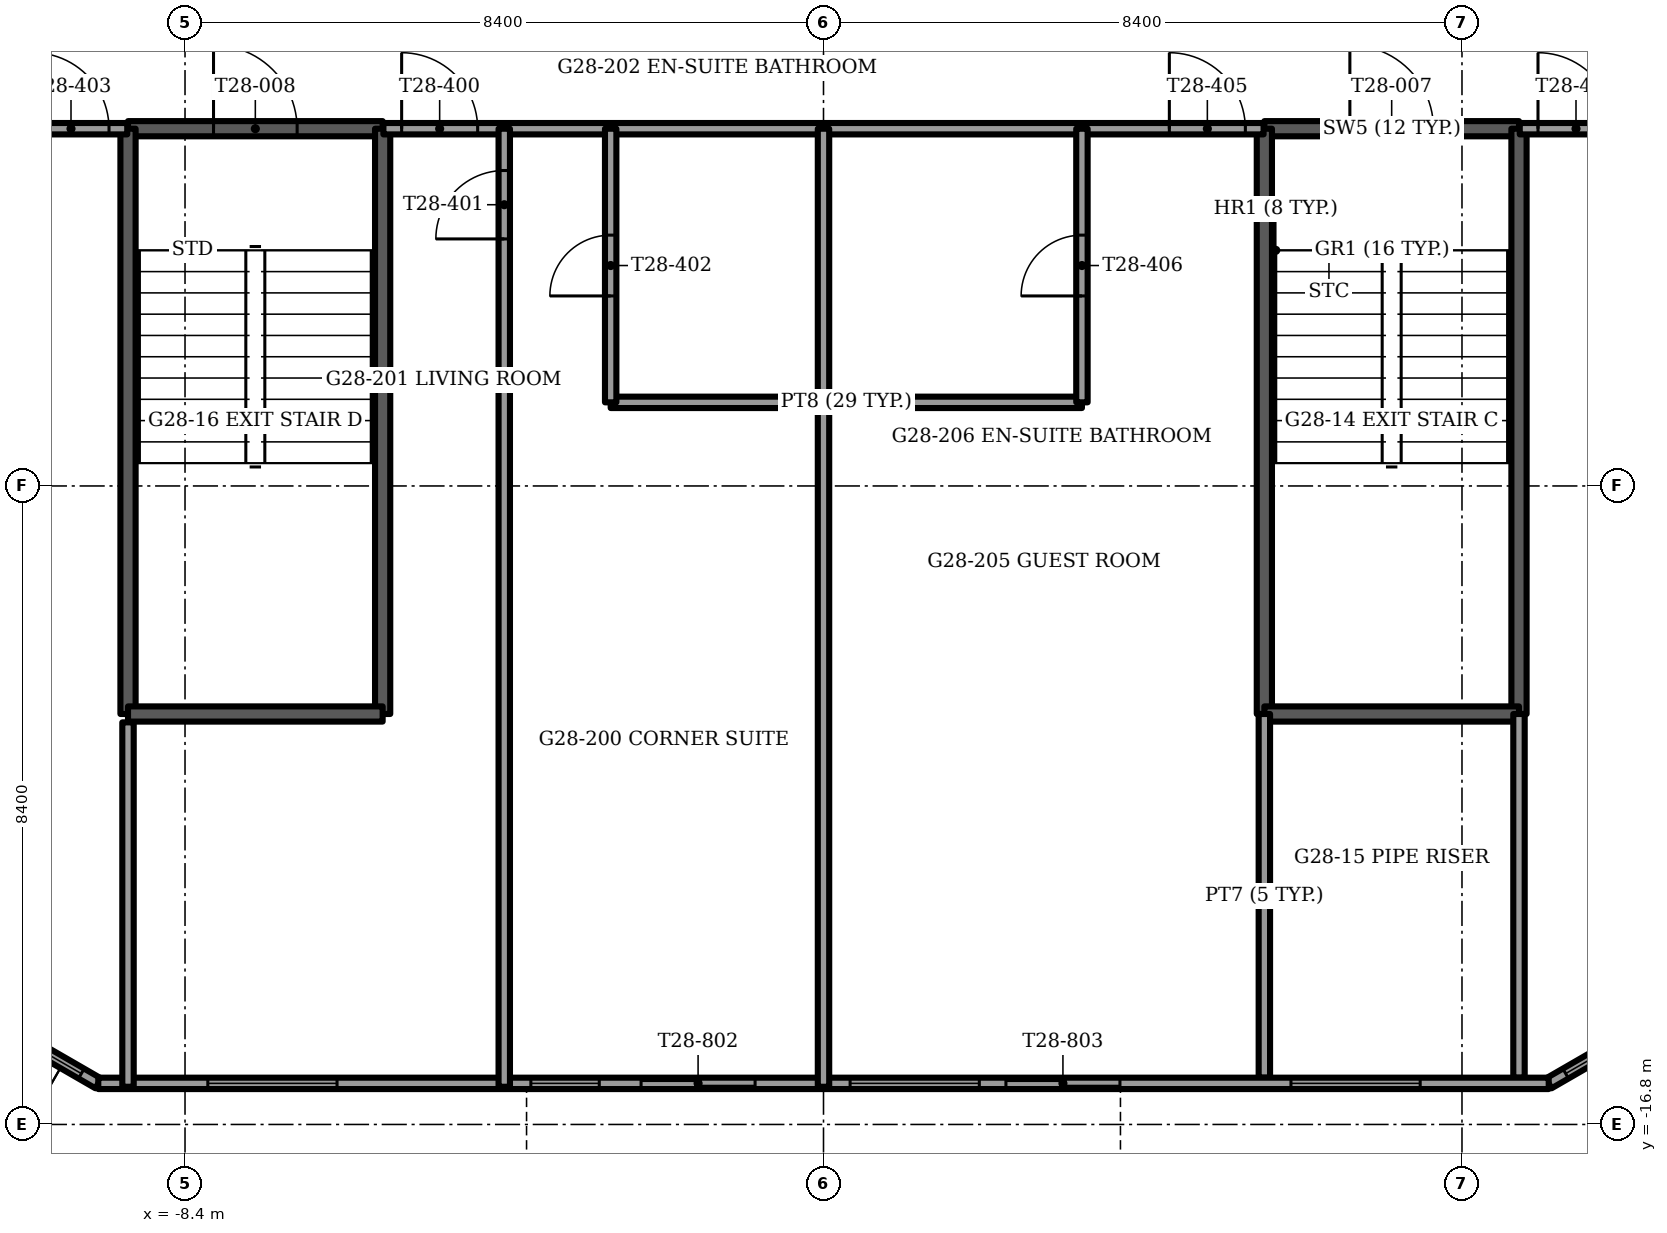
"""IFC4 building model, lengths in metres.
Left out: names, types, materials, properties, quantities, classifications, styles, units other than length and angle.
Written with IfcOpenShell. Run it as: python <this file> out.ifc"""

import sys

from ifc_helpers import new_model, si_unit, direction, frame, frame_2d, origin, place, context, subcontext, project, spatial, rectangle, extrude, element, fill, save


model = new_model("IFC4")
c1 = context("Model", 3, precision=1e-05, world=origin(), true_north=direction((0.0, 1.0)))
c2 = subcontext(c1, "Body", "Model", "MODEL_VIEW")
j1 = project(units=[si_unit("LENGTHUNIT", "METRE"), si_unit("PLANEANGLEUNIT", "RADIAN")], contexts=[c1])
p1 = place(None, origin())
s1 = spatial("IfcSite", under=j1, at=p1, CompositionType="ELEMENT")
p2 = place(p1, origin())
s2 = spatial("IfcBuilding", under=s1, at=p2, CompositionType="ELEMENT")
p3 = place(p2, frame((0.0, 0.0, 116.0)))
s3 = spatial("IfcBuildingStorey", under=s2, at=p3, CompositionType="ELEMENT", Elevation=116.0)
p4 = place(p3, frame((-9.541, -16.26, 0.0), z_axis=(0.0, 0.0, 1.0), x_axis=(1.0, 0.0, 0.0)))
e1 = element("IfcWall", 1, at=p4, inside=s3, PredefinedType="SOLIDWALL", context=c2, shape_type="SweptSolid", body=[
    extrude(rectangle(XDim=19.082, YDim=0.15, at=frame_2d((9.541, 0.0))), origin(), (0.0, 0.0, 1.0), 3.45),
])
p5 = place(p4, frame((1.441, 0.0, 0.15)))
e2 = element("IfcOpeningElement", 2, at=p5, cuts=e1, PredefinedType="OPENING", context=c2, shape_type="SweptSolid", body=[
    extrude(rectangle(XDim=1.7, YDim=2.85, at=frame_2d((0.85, 1.425))), frame((0.0, 0.075, 0.0), z_axis=(0.0, -1.0, 0.0), x_axis=(1.0, 0.0, 0.0)), (0.0, 0.0, 1.0), 0.15),
])
p6 = place(p4, frame((5.691, 0.0, 0.15)))
e3 = element("IfcOpeningElement", 3, at=p6, cuts=e1, PredefinedType="OPENING", context=c2, shape_type="SweptSolid", body=[
    extrude(rectangle(XDim=0.9, YDim=2.85, at=frame_2d((0.45, 1.425))), frame((0.0, 0.075, 0.0), z_axis=(0.0, -1.0, 0.0), x_axis=(1.0, 0.0, 0.0)), (0.0, 0.0, 1.0), 0.15),
])
p7 = place(p4, frame((7.141, 0.0, 0.0)))
e4 = element("IfcOpeningElement", 4, at=p7, cuts=e1, PredefinedType="OPENING", context=c2, shape_type="SweptSolid", body=[
    extrude(rectangle(XDim=1.5, YDim=2.4, at=frame_2d((0.75, 1.2))), frame((0.0, 0.075, 0.0), z_axis=(0.0, -1.0, 0.0), x_axis=(1.0, 0.0, 0.0)), (0.0, 0.0, 1.0), 0.15),
])
p8 = place(p4, frame((9.891, 0.0, 0.15)))
e5 = element("IfcOpeningElement", 5, at=p8, cuts=e1, PredefinedType="OPENING", context=c2, shape_type="SweptSolid", body=[
    extrude(rectangle(XDim=1.7, YDim=2.85, at=frame_2d((0.85, 1.425))), frame((0.0, 0.075, 0.0), z_axis=(0.0, -1.0, 0.0), x_axis=(1.0, 0.0, 0.0)), (0.0, 0.0, 1.0), 0.15),
])
p9 = place(p4, frame((11.941, 0.0, 0.0)))
e6 = element("IfcOpeningElement", 6, at=p9, cuts=e1, PredefinedType="OPENING", context=c2, shape_type="SweptSolid", body=[
    extrude(rectangle(XDim=1.5, YDim=2.4, at=frame_2d((0.75, 1.2))), frame((0.0, 0.075, 0.0), z_axis=(0.0, -1.0, 0.0), x_axis=(1.0, 0.0, 0.0)), (0.0, 0.0, 1.0), 0.15),
])
p10 = place(p4, frame((15.691, 0.0, 0.15)))
e7 = element("IfcOpeningElement", 7, at=p10, cuts=e1, PredefinedType="OPENING", context=c2, shape_type="SweptSolid", body=[
    extrude(rectangle(XDim=1.7, YDim=2.85, at=frame_2d((0.85, 1.425))), frame((0.0, 0.075, 0.0), z_axis=(0.0, -1.0, 0.0), x_axis=(1.0, 0.0, 0.0)), (0.0, 0.0, 1.0), 0.15),
])
p11 = place(p3, frame((-10.463, -15.727, 0.0), z_axis=(0.0, 0.0, 1.0), x_axis=(0.866048165231, -0.499960573946, 0.0)))
e8 = element("IfcWall", 8, at=p11, inside=s3, PredefinedType="SOLIDWALL", context=c2, shape_type="SweptSolid", body=[
    extrude(rectangle(XDim=1.065, YDim=0.15, at=frame_2d((0.532, 0.0))), origin(), (0.0, 0.0, 1.0), 3.45),
])
p12 = place(p11, frame((0.258, 0.0, 0.15)))
e9 = element("IfcOpeningElement", 9, at=p12, cuts=e8, PredefinedType="OPENING", context=c2, shape_type="SweptSolid", body=[
    extrude(rectangle(XDim=0.55, YDim=2.85, at=frame_2d((0.275, 1.425))), frame((0.0, 0.075, 0.0), z_axis=(0.0, -1.0, 0.0), x_axis=(1.0, 0.0, 0.0)), (0.0, 0.0, 1.0), 0.15),
])
p13 = place(p3, frame((9.541, -16.26, 0.0), z_axis=(0.0, 0.0, 1.0), x_axis=(0.866048165231, 0.499960573946, 0.0)))
e10 = element("IfcWall", 10, at=p13, inside=s3, PredefinedType="SOLIDWALL", context=c2, shape_type="SweptSolid", body=[
    extrude(rectangle(XDim=1.065, YDim=0.15, at=frame_2d((0.532, 0.0))), origin(), (0.0, 0.0, 1.0), 3.45),
])
p14 = place(p13, frame((0.258, 0.0, 0.15)))
e11 = element("IfcOpeningElement", 11, at=p14, cuts=e10, PredefinedType="OPENING", context=c2, shape_type="SweptSolid", body=[
    extrude(rectangle(XDim=0.55, YDim=2.85, at=frame_2d((0.275, 1.425))), frame((0.0, 0.075, 0.0), z_axis=(0.0, -1.0, 0.0), x_axis=(1.0, 0.0, 0.0)), (0.0, 0.0, 1.0), 0.15),
])
p15 = place(p3, frame((5.8, -3.7, -0.3), z_axis=(0.0, 0.0, 1.0), x_axis=(1.0, 0.0, 0.0)))
e12 = element("IfcWall", 12, at=p15, inside=s3, PredefinedType="SOLIDWALL", context=c2, shape_type="SweptSolid", body=[
    extrude(rectangle(XDim=3.35, YDim=0.2, at=frame_2d((1.675, 0.0))), origin(), (0.0, 0.0, 1.0), 3.75),
])
p16 = place(p15, frame((1.125, 0.0, 0.0)))
e13 = element("IfcOpeningElement", 13, at=p16, cuts=e12, PredefinedType="OPENING", context=c2, shape_type="SweptSolid", body=[
    extrude(rectangle(XDim=1.1, YDim=2.1, at=frame_2d((0.55, 1.05))), frame((0.0, 0.1, 0.0), z_axis=(0.0, -1.0, 0.0), x_axis=(1.0, 0.0, 0.0)), (0.0, 0.0, 1.0), 0.2),
])
for number, where, z_axis, x_axis in (
    (14, (5.8, -3.7, -0.3), (0.0, 0.0, 1.0), (0.0, -1.0, 0.0)),
    (15, (9.15, -3.7, -0.3), (0.0, 0.0, 1.0), (0.0, -1.0, 0.0)),
):
    element("IfcWall", number, at=place(p3, frame(where, z_axis=z_axis, x_axis=x_axis)), inside=s3, PredefinedType="SOLIDWALL", context=c2, shape_type="SweptSolid", body=[
        extrude(rectangle(XDim=7.7, YDim=0.2, at=frame_2d((3.85, 0.0))), origin(), (0.0, 0.0, 1.0), 3.75),
    ])
p17 = place(p3, frame((5.8, -11.4, -0.3), z_axis=(0.0, 0.0, 1.0), x_axis=(1.0, 0.0, 0.0)))
e16 = element("IfcWall", 16, at=p17, inside=s3, PredefinedType="SOLIDWALL", context=c2, shape_type="SweptSolid", body=[
    extrude(rectangle(XDim=3.35, YDim=0.2, at=frame_2d((1.675, 0.0))), origin(), (0.0, 0.0, 1.0), 3.75),
])
for number, where, z_axis, x_axis in (
    (17, (5.8, -11.4, 0.0), (0.0, 0.0, 1.0), (0.0, -1.0, 0.0)),
    (18, (9.15, -11.4, 0.0), (0.0, 0.0, 1.0), (0.0, -1.0, 0.0)),
):
    element("IfcWall", number, at=place(p3, frame(where, z_axis=z_axis, x_axis=x_axis)), inside=s3, PredefinedType="PARTITIONING", context=c2, shape_type="SweptSolid", body=[
        extrude(rectangle(XDim=4.785, YDim=0.15, at=frame_2d((2.392, 0.0))), origin(), (0.0, 0.0, 1.0), 3.45),
    ])
p18 = place(p3, frame((-9.15, -3.7, -0.3), z_axis=(0.0, 0.0, 1.0), x_axis=(1.0, 0.0, 0.0)))
e19 = element("IfcWall", 19, at=p18, inside=s3, PredefinedType="SOLIDWALL", context=c2, shape_type="SweptSolid", body=[
    extrude(rectangle(XDim=3.35, YDim=0.2, at=frame_2d((1.675, 0.0))), origin(), (0.0, 0.0, 1.0), 3.75),
])
p19 = place(p18, frame((1.125, 0.0, 0.0)))
e20 = element("IfcOpeningElement", 20, at=p19, cuts=e19, PredefinedType="OPENING", context=c2, shape_type="SweptSolid", body=[
    extrude(rectangle(XDim=1.1, YDim=2.1, at=frame_2d((0.55, 1.05))), frame((0.0, 0.1, 0.0), z_axis=(0.0, -1.0, 0.0), x_axis=(1.0, 0.0, 0.0)), (0.0, 0.0, 1.0), 0.2),
])
for number, where, z_axis, x_axis in (
    (21, (-9.15, -3.7, -0.3), (0.0, 0.0, 1.0), (0.0, -1.0, 0.0)),
    (22, (-5.8, -3.7, -0.3), (0.0, 0.0, 1.0), (0.0, -1.0, 0.0)),
):
    element("IfcWall", number, at=place(p3, frame(where, z_axis=z_axis, x_axis=x_axis)), inside=s3, PredefinedType="SOLIDWALL", context=c2, shape_type="SweptSolid", body=[
        extrude(rectangle(XDim=7.7, YDim=0.2, at=frame_2d((3.85, 0.0))), origin(), (0.0, 0.0, 1.0), 3.75),
    ])
p20 = place(p3, frame((-9.15, -11.4, -0.3), z_axis=(0.0, 0.0, 1.0), x_axis=(1.0, 0.0, 0.0)))
e23 = element("IfcWall", 23, at=p20, inside=s3, PredefinedType="SOLIDWALL", context=c2, shape_type="SweptSolid", body=[
    extrude(rectangle(XDim=3.35, YDim=0.2, at=frame_2d((1.675, 0.0))), origin(), (0.0, 0.0, 1.0), 3.75),
])
p21 = place(p3, frame((-2.8, -7.3, 0.0), z_axis=(0.0, 0.0, 1.0), x_axis=(1.0, 0.0, 0.0)))
e24 = element("IfcWall", 24, at=p21, inside=s3, PredefinedType="PARTITIONING", context=c2, shape_type="SweptSolid", body=[
    extrude(rectangle(XDim=6.2, YDim=0.15, at=frame_2d((3.1, 0.0))), origin(), (0.0, 0.0, 1.0), 3.45),
])
p22 = place(p3, frame((-17.459, -3.7, 0.0), z_axis=(0.0, 0.0, 1.0), x_axis=(1.0, 0.0, 0.0)))
e25 = element("IfcWall", 25, at=p22, inside=s3, PredefinedType="PARTITIONING", context=c2, shape_type="SweptSolid", body=[
    extrude(rectangle(XDim=8.299, YDim=0.15, at=frame_2d((4.149, 0.0))), origin(), (0.0, 0.0, 1.0), 3.45),
])
p23 = place(p22, frame((7.059, 0.0, 0.0)))
e26 = element("IfcOpeningElement", 26, at=p23, cuts=e25, PredefinedType="OPENING", context=c2, shape_type="SweptSolid", body=[
    extrude(rectangle(XDim=1.0, YDim=2.1, at=frame_2d((0.5, 1.05))), frame((0.0, 0.075, 0.0), z_axis=(0.0, -1.0, 0.0), x_axis=(1.0, 0.0, 0.0)), (0.0, 0.0, 1.0), 0.15),
])
p24 = place(p3, frame((-5.79, -3.7, 0.0), z_axis=(0.0, 0.0, 1.0), x_axis=(1.0, 0.0, 0.0)))
e27 = element("IfcWall", 27, at=p24, inside=s3, PredefinedType="PARTITIONING", context=c2, shape_type="SweptSolid", body=[
    extrude(rectangle(XDim=11.58, YDim=0.15, at=frame_2d((5.79, 0.0))), origin(), (0.0, 0.0, 1.0), 3.45),
])
p25 = place(p24, frame((0.24, 0.0, 0.0)))
e28 = element("IfcOpeningElement", 28, at=p25, cuts=e27, PredefinedType="OPENING", context=c2, shape_type="SweptSolid", body=[
    extrude(rectangle(XDim=1.0, YDim=2.1, at=frame_2d((0.5, 1.05))), frame((0.0, 0.075, 0.0), z_axis=(0.0, -1.0, 0.0), x_axis=(1.0, 0.0, 0.0)), (0.0, 0.0, 1.0), 0.15),
])
p26 = place(p24, frame((10.34, 0.0, 0.0)))
e29 = element("IfcOpeningElement", 29, at=p26, cuts=e27, PredefinedType="OPENING", context=c2, shape_type="SweptSolid", body=[
    extrude(rectangle(XDim=1.0, YDim=2.1, at=frame_2d((0.5, 1.05))), frame((0.0, 0.075, 0.0), z_axis=(0.0, -1.0, 0.0), x_axis=(1.0, 0.0, 0.0)), (0.0, 0.0, 1.0), 0.15),
])
p27 = place(p3, frame((9.16, -3.7, 0.0), z_axis=(0.0, 0.0, 1.0), x_axis=(1.0, 0.0, 0.0)))
e30 = element("IfcWall", 30, at=p27, inside=s3, PredefinedType="PARTITIONING", context=c2, shape_type="SweptSolid", body=[
    extrude(rectangle(XDim=8.299, YDim=0.15, at=frame_2d((4.149, 0.0))), origin(), (0.0, 0.0, 1.0), 3.45),
])
p28 = place(p27, frame((0.24, 0.0, 0.0)))
e31 = element("IfcOpeningElement", 31, at=p28, cuts=e30, PredefinedType="OPENING", context=c2, shape_type="SweptSolid", body=[
    extrude(rectangle(XDim=1.0, YDim=2.1, at=frame_2d((0.5, 1.05))), frame((0.0, 0.075, 0.0), z_axis=(0.0, -1.0, 0.0), x_axis=(1.0, 0.0, 0.0)), (0.0, 0.0, 1.0), 0.15),
])
p29 = place(p3, frame((3.4, -7.3, 0.0), z_axis=(0.0, 0.0, 1.0), x_axis=(0.0, 1.0, 0.0)))
e32 = element("IfcWall", 32, at=p29, inside=s3, PredefinedType="PARTITIONING", context=c2, shape_type="SweptSolid", body=[
    extrude(rectangle(XDim=3.6, YDim=0.15, at=frame_2d((1.8, 0.0))), origin(), (0.0, 0.0, 1.0), 3.45),
])
p30 = place(p29, frame((1.4, 0.0, 0.0)))
e33 = element("IfcOpeningElement", 33, at=p30, cuts=e32, PredefinedType="OPENING", context=c2, shape_type="SweptSolid", body=[
    extrude(rectangle(XDim=0.8, YDim=2.1, at=frame_2d((0.4, 1.05))), frame((0.0, 0.075, 0.0), z_axis=(0.0, -1.0, 0.0), x_axis=(1.0, 0.0, 0.0)), (0.0, 0.0, 1.0), 0.15),
])
p31 = place(p3, frame((0.0, -16.304, 0.0), z_axis=(0.0, 0.0, 1.0), x_axis=(0.0, 1.0, 0.0)))
e34 = element("IfcWall", 34, at=p31, inside=s3, PredefinedType="PARTITIONING", context=c2, shape_type="SweptSolid", body=[
    extrude(rectangle(XDim=12.604, YDim=0.15, at=frame_2d((6.302, 0.0))), origin(), (0.0, 0.0, 1.0), 3.45),
])
p32 = place(p3, frame((-2.8, -7.3, 0.0), z_axis=(0.0, 0.0, 1.0), x_axis=(0.0, 1.0, 0.0)))
e35 = element("IfcWall", 35, at=p32, inside=s3, PredefinedType="PARTITIONING", context=c2, shape_type="SweptSolid", body=[
    extrude(rectangle(XDim=3.6, YDim=0.15, at=frame_2d((1.8, 0.0))), origin(), (0.0, 0.0, 1.0), 3.45),
])
p33 = place(p32, frame((1.4, 0.0, 0.0)))
e36 = element("IfcOpeningElement", 36, at=p33, cuts=e35, PredefinedType="OPENING", context=c2, shape_type="SweptSolid", body=[
    extrude(rectangle(XDim=0.8, YDim=2.1, at=frame_2d((0.4, 1.05))), frame((0.0, 0.075, 0.0), z_axis=(0.0, -1.0, 0.0), x_axis=(1.0, 0.0, 0.0)), (0.0, 0.0, 1.0), 0.15),
])
p34 = place(p3, frame((-4.2, -16.304, 0.0), z_axis=(0.0, 0.0, 1.0), x_axis=(0.0, 1.0, 0.0)))
e37 = element("IfcWall", 37, at=p34, inside=s3, PredefinedType="PARTITIONING", context=c2, shape_type="SweptSolid", body=[
    extrude(rectangle(XDim=12.604, YDim=0.15, at=frame_2d((6.302, 0.0))), origin(), (0.0, 0.0, 1.0), 3.45),
])
p35 = place(p34, frame((11.154, 0.0, 0.0)))
e38 = element("IfcOpeningElement", 38, at=p35, cuts=e37, PredefinedType="OPENING", context=c2, shape_type="SweptSolid", body=[
    extrude(rectangle(XDim=0.9, YDim=2.1, at=frame_2d((0.45, 1.05))), frame((0.0, 0.075, 0.0), z_axis=(0.0, -1.0, 0.0), x_axis=(1.0, 0.0, 0.0)), (0.0, 0.0, 1.0), 0.15),
])
p36 = place(p3, frame((-9.15, -16.304, 0.0), z_axis=(0.0, 0.0, 1.0), x_axis=(0.0, 1.0, 0.0)))
e39 = element("IfcWall", 39, at=p36, inside=s3, PredefinedType="PARTITIONING", context=c2, shape_type="SweptSolid", body=[
    extrude(rectangle(XDim=4.794, YDim=0.15, at=frame_2d((2.397, 0.0))), origin(), (0.0, 0.0, 1.0), 3.45),
])
p37 = place(p5, origin())
e40 = element("IfcWindow", 40, at=p37, inside=s3, PartitioningType="SINGLE_PANEL", PredefinedType="WINDOW", context=c2, shape_type="SweptSolid", body=[
    extrude(rectangle(XDim=1.7, YDim=2.85, at=frame_2d((0.85, 1.425))), frame((0.0, 0.03, 0.0), z_axis=(0.0, -1.0, 0.0), x_axis=(1.0, 0.0, 0.0)), (0.0, 0.0, 1.0), 0.06),
])
fill(e2, e40)
p38 = place(p6, origin())
e41 = element("IfcWindow", 41, at=p38, inside=s3, PartitioningType="SINGLE_PANEL", PredefinedType="WINDOW", context=c2, shape_type="SweptSolid", body=[
    extrude(rectangle(XDim=0.9, YDim=2.85, at=frame_2d((0.45, 1.425))), frame((0.0, 0.03, 0.0), z_axis=(0.0, -1.0, 0.0), x_axis=(1.0, 0.0, 0.0)), (0.0, 0.0, 1.0), 0.06),
])
fill(e3, e41)
p39 = place(p7, origin())
e42 = element("IfcDoor", 42, at=p39, inside=s3, OperationType="SLIDING_TO_RIGHT", PredefinedType="DOOR", context=c2, shape_type="SweptSolid", body=[
    extrude(rectangle(XDim=1.5, YDim=2.4, at=frame_2d((0.75, 1.2))), frame((0.0, 0.025, 0.0), z_axis=(0.0, -1.0, 0.0), x_axis=(1.0, 0.0, 0.0)), (0.0, 0.0, 1.0), 0.05),
])
fill(e4, e42)
p40 = place(p8, origin())
e43 = element("IfcWindow", 43, at=p40, inside=s3, PartitioningType="SINGLE_PANEL", PredefinedType="WINDOW", context=c2, shape_type="SweptSolid", body=[
    extrude(rectangle(XDim=1.7, YDim=2.85, at=frame_2d((0.85, 1.425))), frame((0.0, 0.03, 0.0), z_axis=(0.0, -1.0, 0.0), x_axis=(1.0, 0.0, 0.0)), (0.0, 0.0, 1.0), 0.06),
])
fill(e5, e43)
p41 = place(p9, origin())
e44 = element("IfcDoor", 44, at=p41, inside=s3, OperationType="SLIDING_TO_LEFT", PredefinedType="DOOR", context=c2, shape_type="SweptSolid", body=[
    extrude(rectangle(XDim=1.5, YDim=2.4, at=frame_2d((0.75, 1.2))), frame((0.0, 0.025, 0.0), z_axis=(0.0, -1.0, 0.0), x_axis=(1.0, 0.0, 0.0)), (0.0, 0.0, 1.0), 0.05),
])
fill(e6, e44)
p42 = place(p10, origin())
e45 = element("IfcWindow", 45, at=p42, inside=s3, PartitioningType="SINGLE_PANEL", PredefinedType="WINDOW", context=c2, shape_type="SweptSolid", body=[
    extrude(rectangle(XDim=1.7, YDim=2.85, at=frame_2d((0.85, 1.425))), frame((0.0, 0.03, 0.0), z_axis=(0.0, -1.0, 0.0), x_axis=(1.0, 0.0, 0.0)), (0.0, 0.0, 1.0), 0.06),
])
fill(e7, e45)
p43 = place(p12, origin())
e46 = element("IfcWindow", 46, at=p43, inside=s3, PartitioningType="SINGLE_PANEL", PredefinedType="WINDOW", context=c2, shape_type="SweptSolid", body=[
    extrude(rectangle(XDim=0.55, YDim=2.85, at=frame_2d((0.275, 1.425))), frame((0.0, 0.03, 0.0), z_axis=(0.0, -1.0, 0.0), x_axis=(1.0, 0.0, 0.0)), (0.0, 0.0, 1.0), 0.06),
])
fill(e9, e46)
p44 = place(p14, origin())
e47 = element("IfcWindow", 47, at=p44, inside=s3, PartitioningType="SINGLE_PANEL", PredefinedType="WINDOW", context=c2, shape_type="SweptSolid", body=[
    extrude(rectangle(XDim=0.55, YDim=2.85, at=frame_2d((0.275, 1.425))), frame((0.0, 0.03, 0.0), z_axis=(0.0, -1.0, 0.0), x_axis=(1.0, 0.0, 0.0)), (0.0, 0.0, 1.0), 0.06),
])
fill(e11, e47)
p45 = place(p16, origin())
e48 = element("IfcDoor", 48, at=p45, inside=s3, OperationType="SINGLE_SWING_LEFT", PredefinedType="DOOR", context=c2, shape_type="SweptSolid", body=[
    extrude(rectangle(XDim=1.1, YDim=2.1, at=frame_2d((0.55, 1.05))), frame((0.0, 0.025, 0.0), z_axis=(0.0, -1.0, 0.0), x_axis=(1.0, 0.0, 0.0)), (0.0, 0.0, 1.0), 0.05),
])
fill(e13, e48)
p46 = place(p19, origin())
e49 = element("IfcDoor", 49, at=p46, inside=s3, OperationType="SINGLE_SWING_LEFT", PredefinedType="DOOR", context=c2, shape_type="SweptSolid", body=[
    extrude(rectangle(XDim=1.1, YDim=2.1, at=frame_2d((0.55, 1.05))), frame((0.0, 0.025, 0.0), z_axis=(0.0, -1.0, 0.0), x_axis=(1.0, 0.0, 0.0)), (0.0, 0.0, 1.0), 0.05),
])
fill(e20, e49)
p47 = place(p25, origin())
e50 = element("IfcDoor", 50, at=p47, inside=s3, OperationType="SINGLE_SWING_LEFT", PredefinedType="DOOR", context=c2, shape_type="SweptSolid", body=[
    extrude(rectangle(XDim=1.0, YDim=2.1, at=frame_2d((0.5, 1.05))), frame((0.0, 0.025, 0.0), z_axis=(0.0, -1.0, 0.0), x_axis=(1.0, 0.0, 0.0)), (0.0, 0.0, 1.0), 0.05),
])
fill(e28, e50)
p48 = place(p35, origin())
e51 = element("IfcDoor", 51, at=p48, inside=s3, OperationType="SINGLE_SWING_RIGHT", PredefinedType="DOOR", context=c2, shape_type="SweptSolid", body=[
    extrude(rectangle(XDim=0.9, YDim=2.1, at=frame_2d((0.45, 1.05))), frame((0.0, 0.025, 0.0), z_axis=(0.0, -1.0, 0.0), x_axis=(1.0, 0.0, 0.0)), (0.0, 0.0, 1.0), 0.05),
])
fill(e38, e51)
p49 = place(p33, origin())
e52 = element("IfcDoor", 52, at=p49, inside=s3, OperationType="SINGLE_SWING_RIGHT", PredefinedType="DOOR", context=c2, shape_type="SweptSolid", body=[
    extrude(rectangle(XDim=0.8, YDim=2.1, at=frame_2d((0.4, 1.05))), frame((0.0, 0.025, 0.0), z_axis=(0.0, -1.0, 0.0), x_axis=(1.0, 0.0, 0.0)), (0.0, 0.0, 1.0), 0.05),
])
fill(e36, e52)
p50 = place(p23, origin())
e53 = element("IfcDoor", 53, at=p50, inside=s3, OperationType="SINGLE_SWING_RIGHT", PredefinedType="DOOR", context=c2, shape_type="SweptSolid", body=[
    extrude(rectangle(XDim=1.0, YDim=2.1, at=frame_2d((0.5, 1.05))), frame((0.0, 0.025, 0.0), z_axis=(0.0, -1.0, 0.0), x_axis=(1.0, 0.0, 0.0)), (0.0, 0.0, 1.0), 0.05),
])
fill(e26, e53)
p51 = place(p26, origin())
e54 = element("IfcDoor", 54, at=p51, inside=s3, OperationType="SINGLE_SWING_RIGHT", PredefinedType="DOOR", context=c2, shape_type="SweptSolid", body=[
    extrude(rectangle(XDim=1.0, YDim=2.1, at=frame_2d((0.5, 1.05))), frame((0.0, 0.025, 0.0), z_axis=(0.0, -1.0, 0.0), x_axis=(1.0, 0.0, 0.0)), (0.0, 0.0, 1.0), 0.05),
])
fill(e29, e54)
p52 = place(p30, origin())
e55 = element("IfcDoor", 55, at=p52, inside=s3, OperationType="SINGLE_SWING_RIGHT", PredefinedType="DOOR", context=c2, shape_type="SweptSolid", body=[
    extrude(rectangle(XDim=0.8, YDim=2.1, at=frame_2d((0.4, 1.05))), frame((0.0, 0.025, 0.0), z_axis=(0.0, -1.0, 0.0), x_axis=(1.0, 0.0, 0.0)), (0.0, 0.0, 1.0), 0.05),
])
fill(e33, e55)
p53 = place(p28, origin())
e56 = element("IfcDoor", 56, at=p53, inside=s3, OperationType="SINGLE_SWING_LEFT", PredefinedType="DOOR", context=c2, shape_type="SweptSolid", body=[
    extrude(rectangle(XDim=1.0, YDim=2.1, at=frame_2d((0.5, 1.05))), frame((0.0, 0.025, 0.0), z_axis=(0.0, -1.0, 0.0), x_axis=(1.0, 0.0, 0.0)), (0.0, 0.0, 1.0), 0.05),
])
fill(e31, e56)
save(model, sys.argv[1])
